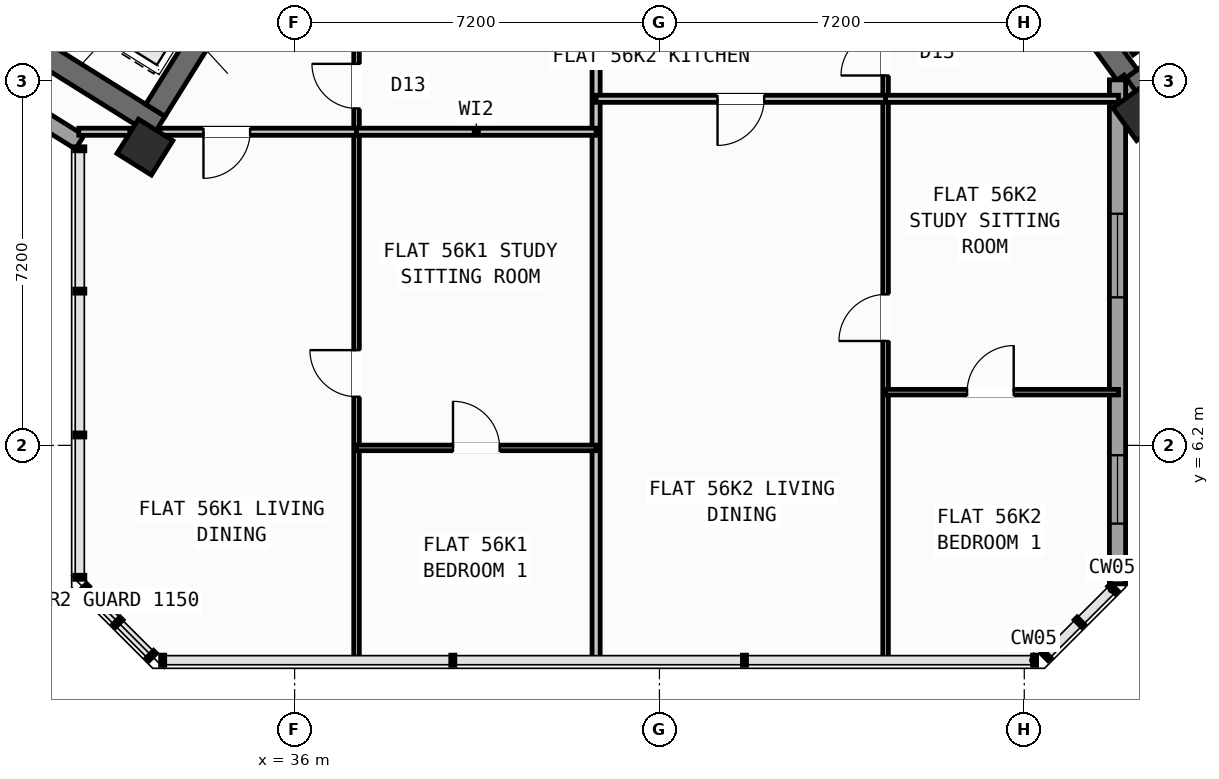
"""IFC4 building model, lengths in metres.
Left out: names, types, materials, properties, quantities, classifications, styles, units other than length and angle.
Written with IfcOpenShell. Run it as: python <this file> out.ifc"""

import sys

from ifc_helpers import new_model, si_unit, direction, frame, frame_2d, origin, origin_2d, place, context, subcontext, project, spatial, rectangle, hollow_rectangle, extrude, source, transform, mapped, element, fill, save


model = new_model("IFC4")
c1 = context("Model", 3, precision=1e-05, world=origin(), true_north=direction((0.0, 1.0)))
c2 = subcontext(c1, "Body", "Model", "MODEL_VIEW")
j1 = project(units=[si_unit("LENGTHUNIT", "METRE"), si_unit("PLANEANGLEUNIT", "RADIAN")], contexts=[c1])
p1 = place(None, origin())
s1 = spatial("IfcSite", under=j1, at=p1, CompositionType="ELEMENT")
p2 = place(p1, origin())
s2 = spatial("IfcBuilding", under=s1, at=p2, CompositionType="ELEMENT")
p3 = place(p2, frame((0.0, 0.0, 222.0)))
s3 = spatial("IfcBuildingStorey", under=s2, at=p3, CompositionType="ELEMENT", Elevation=222.0)
p4 = place(p3, frame((33.324, 12.503, 0.0), z_axis=(0.0, 0.0, 1.0), x_axis=(-0.848043529849, 0.529926571782, 0.0)))
e1 = element("IfcWall", 1, at=p4, inside=s3, PredefinedType="SHEAR", context=c2, shape_type="SweptSolid", body=[
    extrude(rectangle(XDim=13.04, YDim=0.45, at=frame_2d((6.52, 0.0))), origin(), (0.0, 0.0, 1.0), 3.35),
])
p5 = place(p3, frame((36.683, 18.304, 0.0), z_axis=(0.0, 0.0, 1.0), x_axis=(-0.529904039071, -0.848057609704, 0.0)))
e2 = element("IfcWall", 2, at=p5, inside=s3, PredefinedType="SHEAR", context=c2, shape_type="SweptSolid", body=[
    extrude(rectangle(XDim=6.475, YDim=0.45, at=frame_2d((3.238, 0.0))), origin(), (0.0, 0.0, 1.0), 3.35),
])
p6 = place(p3, frame((52.399, 13.169, 0.0), z_axis=(0.0, 0.0, 1.0), x_axis=(0.809022352778, 0.587777877013, 0.0)))
e3 = element("IfcWall", 3, at=p6, inside=s3, PredefinedType="SHEAR", context=c2, shape_type="SweptSolid", body=[
    extrude(rectangle(XDim=12.24, YDim=0.45, at=frame_2d((6.12, 0.0))), origin(), (0.0, 0.0, 1.0), 3.35),
])
p7 = place(p3, frame((52.449, 13.483, 0.0), z_axis=(0.0, 0.0, 1.0), x_axis=(-0.587819244441, 0.808992296542, 0.0)))
e4 = element("IfcWall", 4, at=p7, inside=s3, PredefinedType="SHEAR", context=c2, shape_type="SweptSolid", body=[
    extrude(rectangle(XDim=3.625, YDim=0.45, at=frame_2d((1.812, 0.0))), origin(), (0.0, 0.0, 1.0), 3.35),
])
m1 = source(origin(), c2, "Body", "SweptSolid", [
    extrude(hollow_rectangle(XDim=0.8, YDim=0.8, WallThickness=0.032, at=origin_2d()), origin(), (0.0, 0.0, 1.0), 3.6),
])
for number, where, z_axis, x_axis in (
    (5, (33.046, 12.087, 0.0), (0.0, 0.0, 1.0), (-0.848, 0.53, 0.0)),
    (6, (52.705, 12.773, 0.0), (0.0, 0.0, 1.0), (0.809, 0.588, 0.0)),
):
    element("IfcColumn", number, at=place(p3, frame(where, z_axis=z_axis, x_axis=x_axis)), inside=s3, PredefinedType="COLUMN", context=c2, shape_type="MappedRepresentation", body=[
        mapped(m1, transform((0.0, 0.0, 0.0), scale=1.0)),
    ])
p8 = place(p3, frame((31.76, 12.183, 0.0), z_axis=(0.0, 0.0, 1.0), x_axis=(-0.848047074256, 0.529920899612, 0.0)))
e7 = element("IfcWall", 7, at=p8, inside=s3, PredefinedType="STANDARD", context=c2, shape_type="SweptSolid", body=[
    extrude(rectangle(XDim=30.652, YDim=0.32, at=frame_2d((15.326, 0.0))), origin(), (0.0, 0.0, 1.0), 3.35),
])
p9 = place(p8, frame((15.166, 0.0, 0.0)))
e8 = element("IfcOpeningElement", 8, at=p9, cuts=e7, PredefinedType="OPENING", context=c2, shape_type="SweptSolid", body=[
    extrude(rectangle(XDim=1.2, YDim=2.15, at=frame_2d((0.6, 1.075))), frame((0.0, 0.17, 0.0), z_axis=(0.0, -1.0, 0.0), x_axis=(1.0, 0.0, 0.0)), (0.0, 0.0, 1.0), 0.34),
])
p10 = place(p8, frame((2.24, 0.0, 0.9)))
e9 = element("IfcOpeningElement", 9, at=p10, cuts=e7, PredefinedType="OPENING", context=c2, shape_type="SweptSolid", body=[
    extrude(rectangle(XDim=1.65, YDim=1.45, at=frame_2d((0.825, 0.725))), frame((0.0, 0.17, 0.0), z_axis=(0.0, -1.0, 0.0), x_axis=(1.0, 0.0, 0.0)), (0.0, 0.0, 1.0), 0.34),
])
p11 = place(p8, frame((7.469, 0.0, 0.9)))
e10 = element("IfcOpeningElement", 10, at=p11, cuts=e7, PredefinedType="OPENING", context=c2, shape_type="SweptSolid", body=[
    extrude(rectangle(XDim=1.65, YDim=1.45, at=frame_2d((0.825, 0.725))), frame((0.0, 0.17, 0.0), z_axis=(0.0, -1.0, 0.0), x_axis=(1.0, 0.0, 0.0)), (0.0, 0.0, 1.0), 0.34),
])
p12 = place(p8, frame((12.623, 0.0, 1.0)))
e11 = element("IfcOpeningElement", 11, at=p12, cuts=e7, PredefinedType="OPENING", context=c2, shape_type="SweptSolid", body=[
    extrude(rectangle(XDim=0.9, YDim=1.25, at=frame_2d((0.45, 0.625))), frame((0.0, 0.17, 0.0), z_axis=(0.0, -1.0, 0.0), x_axis=(1.0, 0.0, 0.0)), (0.0, 0.0, 1.0), 0.34),
])
p13 = place(p8, frame((19.583, 0.0, 1.0)))
e12 = element("IfcOpeningElement", 12, at=p13, cuts=e7, PredefinedType="OPENING", context=c2, shape_type="SweptSolid", body=[
    extrude(rectangle(XDim=0.9, YDim=1.25, at=frame_2d((0.45, 0.625))), frame((0.0, 0.17, 0.0), z_axis=(0.0, -1.0, 0.0), x_axis=(1.0, 0.0, 0.0)), (0.0, 0.0, 1.0), 0.34),
])
p14 = place(p8, frame((22.033, 0.0, 1.0)))
e13 = element("IfcOpeningElement", 13, at=p14, cuts=e7, PredefinedType="OPENING", context=c2, shape_type="SweptSolid", body=[
    extrude(rectangle(XDim=0.9, YDim=1.25, at=frame_2d((0.45, 0.625))), frame((0.0, 0.17, 0.0), z_axis=(0.0, -1.0, 0.0), x_axis=(1.0, 0.0, 0.0)), (0.0, 0.0, 1.0), 0.34),
])
p15 = place(p8, frame((27.666, 0.0, 0.9)))
e14 = element("IfcOpeningElement", 14, at=p15, cuts=e7, PredefinedType="OPENING", context=c2, shape_type="SweptSolid", body=[
    extrude(rectangle(XDim=1.35, YDim=1.45, at=frame_2d((0.675, 0.725))), frame((0.0, 0.17, 0.0), z_axis=(0.0, -1.0, 0.0), x_axis=(1.0, 0.0, 0.0)), (0.0, 0.0, 1.0), 0.34),
])
p16 = place(p3, frame((52.937, 12.455, 0.0), z_axis=(0.0, 0.0, 1.0), x_axis=(-0.587706324018, 0.809074333241, 0.0)))
e15 = element("IfcWall", 15, at=p16, inside=s3, PredefinedType="STANDARD", context=c2, shape_type="SweptSolid", body=[
    extrude(rectangle(XDim=1.186, YDim=0.32, at=frame_2d((0.593, 0.0))), origin(), (0.0, 0.0, 1.0), 3.35),
])
p17 = place(p3, frame((52.24, 13.414, 0.0), z_axis=(0.0, 0.0, 1.0), x_axis=(0.0, -1.0, 0.0)))
e16 = element("IfcWall", 16, at=p17, inside=s3, PredefinedType="STANDARD", context=c2, shape_type="SweptSolid", body=[
    extrude(rectangle(XDim=9.948, YDim=0.32, at=frame_2d((4.974, 0.0))), origin(), (0.0, 0.0, 1.0), 3.35),
])
p18 = place(p17, frame((2.643, 0.0, 0.9)))
e17 = element("IfcOpeningElement", 17, at=p18, cuts=e16, PredefinedType="OPENING", context=c2, shape_type="SweptSolid", body=[
    extrude(rectangle(XDim=1.65, YDim=1.45, at=frame_2d((0.825, 0.725))), frame((0.0, 0.17, 0.0), z_axis=(0.0, -1.0, 0.0), x_axis=(1.0, 0.0, 0.0)), (0.0, 0.0, 1.0), 0.34),
])
p19 = place(p17, frame((7.408, 0.0, 0.9)))
e18 = element("IfcOpeningElement", 18, at=p19, cuts=e16, PredefinedType="OPENING", context=c2, shape_type="SweptSolid", body=[
    extrude(rectangle(XDim=1.35, YDim=1.45, at=frame_2d((0.675, 0.725))), frame((0.0, 0.17, 0.0), z_axis=(0.0, -1.0, 0.0), x_axis=(1.0, 0.0, 0.0)), (0.0, 0.0, 1.0), 0.34),
])
p20 = place(p3, frame((52.472, 14.013, 0.0), z_axis=(0.0, 0.0, 1.0), x_axis=(0.809028366311, 0.587769599847, 0.0)))
e19 = element("IfcWall", 19, at=p20, inside=s3, PredefinedType="SHEAR", context=c2, shape_type="SweptSolid", body=[
    extrude(rectangle(XDim=7.33, YDim=0.26, at=frame_2d((3.665, 0.0))), origin(), (0.0, 0.0, 1.0), 3.35),
])
p21 = place(p3, frame((41.95, 1.96, 0.0), z_axis=(0.0, 0.0, 1.0), x_axis=(0.0, 1.0, 0.0)))
e20 = element("IfcWall", 20, at=p21, inside=s3, PredefinedType="PARTITIONING", context=c2, shape_type="SweptSolid", body=[
    extrude(rectangle(XDim=13.46, YDim=0.16, at=frame_2d((6.73, 0.0))), origin(), (0.0, 0.0, 1.0), 3.34),
])
p22 = place(p3, frame((37.222, 1.96, 0.0), z_axis=(0.0, 0.0, 1.0), x_axis=(0.0, 1.0, 0.0)))
e21 = element("IfcWall", 21, at=p22, inside=s3, PredefinedType="PARTITIONING", context=c2, shape_type="SweptSolid", body=[
    extrude(rectangle(XDim=13.46, YDim=0.11, at=frame_2d((6.73, 0.0))), origin(), (0.0, 0.0, 1.0), 3.34),
])
p23 = place(p22, frame((5.2, 0.0, 0.0)))
e22 = element("IfcOpeningElement", 22, at=p23, cuts=e21, PredefinedType="OPENING", context=c2, shape_type="SweptSolid", body=[
    extrude(rectangle(XDim=0.92, YDim=2.08, at=frame_2d((0.46, 1.04))), frame((0.0, 0.065, 0.0), z_axis=(0.0, -1.0, 0.0), x_axis=(1.0, 0.0, 0.0)), (0.0, 0.0, 1.0), 0.13),
])
p24 = place(p22, frame((10.89, 0.0, 0.0)))
e23 = element("IfcOpeningElement", 23, at=p24, cuts=e21, PredefinedType="OPENING", context=c2, shape_type="SweptSolid", body=[
    extrude(rectangle(XDim=0.88, YDim=2.08, at=frame_2d((0.44, 1.04))), frame((0.0, 0.065, 0.0), z_axis=(0.0, -1.0, 0.0), x_axis=(1.0, 0.0, 0.0)), (0.0, 0.0, 1.0), 0.13),
])
p25 = place(p3, frame((31.74, 12.39, 0.0), z_axis=(0.0, 0.0, 1.0), x_axis=(1.0, 0.0, 0.0)))
e24 = element("IfcWall", 24, at=p25, inside=s3, PredefinedType="PLUMBINGWALL", context=c2, shape_type="SweptSolid", body=[
    extrude(rectangle(XDim=1.01, YDim=0.14, at=frame_2d((0.505, 0.0))), origin(), (0.0, 0.0, 1.0), 3.34),
])
p26 = place(p3, frame((33.339, 12.39, 0.0), z_axis=(0.0, 0.0, 1.0), x_axis=(1.0, 0.0, 0.0)))
e25 = element("IfcWall", 25, at=p26, inside=s3, PredefinedType="PLUMBINGWALL", context=c2, shape_type="SweptSolid", body=[
    extrude(rectangle(XDim=3.883, YDim=0.14, at=frame_2d((1.942, 0.0))), origin(), (0.0, 0.0, 1.0), 2.525),
])
p27 = place(p26, frame((0.863, 0.0, 0.0)))
e26 = element("IfcOpeningElement", 26, at=p27, cuts=e25, PredefinedType="OPENING", context=c2, shape_type="SweptSolid", body=[
    extrude(rectangle(XDim=0.92, YDim=2.08, at=frame_2d((0.46, 1.04))), frame((0.0, 0.08, 0.0), z_axis=(0.0, -1.0, 0.0), x_axis=(1.0, 0.0, 0.0)), (0.0, 0.0, 1.0), 0.16),
])
p28 = place(p3, frame((37.222, 12.39, 0.0), z_axis=(0.0, 0.0, 1.0), x_axis=(1.0, 0.0, 0.0)))
e27 = element("IfcWall", 27, at=p28, inside=s3, PredefinedType="PLUMBINGWALL", context=c2, shape_type="SweptSolid", body=[
    extrude(rectangle(XDim=4.728, YDim=0.14, at=frame_2d((2.364, 0.0))), origin(), (0.0, 0.0, 1.0), 2.525),
])
p29 = place(p3, frame((37.222, 6.15, 0.0), z_axis=(0.0, 0.0, 1.0), x_axis=(1.0, 0.0, 0.0)))
e28 = element("IfcWall", 28, at=p29, inside=s3, PredefinedType="PARTITIONING", context=c2, shape_type="SweptSolid", body=[
    extrude(rectangle(XDim=4.728, YDim=0.11, at=frame_2d((2.364, 0.0))), origin(), (0.0, 0.0, 1.0), 3.34),
])
p30 = place(p29, frame((1.904, 0.0, 0.0)))
e29 = element("IfcOpeningElement", 29, at=p30, cuts=e28, PredefinedType="OPENING", context=c2, shape_type="SweptSolid", body=[
    extrude(rectangle(XDim=0.92, YDim=2.08, at=frame_2d((0.46, 1.04))), frame((0.0, 0.065, 0.0), z_axis=(0.0, -1.0, 0.0), x_axis=(1.0, 0.0, 0.0)), (0.0, 0.0, 1.0), 0.13),
])
p31 = place(p3, frame((47.663, 1.96, 0.0), z_axis=(0.0, 0.0, 1.0), x_axis=(0.0, 1.0, 0.0)))
e30 = element("IfcWall", 30, at=p31, inside=s3, PredefinedType="PARTITIONING", context=c2, shape_type="SweptSolid", body=[
    extrude(rectangle(XDim=13.46, YDim=0.11, at=frame_2d((6.73, 0.0))), origin(), (0.0, 0.0, 1.0), 3.34),
])
p32 = place(p31, frame((6.3, 0.0, 0.0)))
e31 = element("IfcOpeningElement", 31, at=p32, cuts=e30, PredefinedType="OPENING", context=c2, shape_type="SweptSolid", body=[
    extrude(rectangle(XDim=0.92, YDim=2.08, at=frame_2d((0.46, 1.04))), frame((0.0, 0.065, 0.0), z_axis=(0.0, -1.0, 0.0), x_axis=(1.0, 0.0, 0.0)), (0.0, 0.0, 1.0), 0.13),
])
p33 = place(p31, frame((11.54, 0.0, 0.0)))
e32 = element("IfcOpeningElement", 32, at=p33, cuts=e30, PredefinedType="OPENING", context=c2, shape_type="SweptSolid", body=[
    extrude(rectangle(XDim=0.88, YDim=2.08, at=frame_2d((0.44, 1.04))), frame((0.0, 0.065, 0.0), z_axis=(0.0, -1.0, 0.0), x_axis=(1.0, 0.0, 0.0)), (0.0, 0.0, 1.0), 0.13),
])
p34 = place(p3, frame((41.95, 13.04, 0.0), z_axis=(0.0, 0.0, 1.0), x_axis=(1.0, 0.0, 0.0)))
e33 = element("IfcWall", 33, at=p34, inside=s3, PredefinedType="PLUMBINGWALL", context=c2, shape_type="SweptSolid", body=[
    extrude(rectangle(XDim=5.713, YDim=0.14, at=frame_2d((2.856, 0.0))), origin(), (0.0, 0.0, 1.0), 3.34),
])
p35 = place(p34, frame((2.396, 0.0, 0.0)))
e34 = element("IfcOpeningElement", 34, at=p35, cuts=e33, PredefinedType="OPENING", context=c2, shape_type="SweptSolid", body=[
    extrude(rectangle(XDim=0.92, YDim=2.08, at=frame_2d((0.46, 1.04))), frame((0.0, 0.08, 0.0), z_axis=(0.0, -1.0, 0.0), x_axis=(1.0, 0.0, 0.0)), (0.0, 0.0, 1.0), 0.16),
])
p36 = place(p3, frame((47.663, 13.04, 0.0), z_axis=(0.0, 0.0, 1.0), x_axis=(1.0, 0.0, 0.0)))
e35 = element("IfcWall", 35, at=p36, inside=s3, PredefinedType="PLUMBINGWALL", context=c2, shape_type="SweptSolid", body=[
    extrude(rectangle(XDim=4.597, YDim=0.14, at=frame_2d((2.298, 0.0))), origin(), (0.0, 0.0, 1.0), 2.525),
])
p37 = place(p3, frame((47.663, 7.25, 0.0), z_axis=(0.0, 0.0, 1.0), x_axis=(1.0, 0.0, 0.0)))
e36 = element("IfcWall", 36, at=p37, inside=s3, PredefinedType="PARTITIONING", context=c2, shape_type="SweptSolid", body=[
    extrude(rectangle(XDim=4.597, YDim=0.11, at=frame_2d((2.298, 0.0))), origin(), (0.0, 0.0, 1.0), 3.34),
])
p38 = place(p37, frame((1.608, 0.0, 0.0)))
e37 = element("IfcOpeningElement", 37, at=p38, cuts=e36, PredefinedType="OPENING", context=c2, shape_type="SweptSolid", body=[
    extrude(rectangle(XDim=0.92, YDim=2.08, at=frame_2d((0.46, 1.04))), frame((0.0, 0.065, 0.0), z_axis=(0.0, -1.0, 0.0), x_axis=(1.0, 0.0, 0.0)), (0.0, 0.0, 1.0), 0.13),
])
m2 = source(origin(), c2, "Body", "SweptSolid", [
    extrude(rectangle(XDim=1.65, YDim=1.45, at=frame_2d((0.825, 0.725))), frame((0.0, 0.03, 0.0), z_axis=(0.0, -1.0, 0.0), x_axis=(1.0, 0.0, 0.0)), (0.0, 0.0, 1.0), 0.06),
])
p39 = place(p18, origin())
e38 = element("IfcWindow", 38, at=p39, inside=s3, PartitioningType="SINGLE_PANEL", PredefinedType="WINDOW", context=c2, shape_type="MappedRepresentation", body=[
    mapped(m2, transform((0.0, 0.0, 0.0), scale=1.0)),
])
fill(e17, e38)
m3 = source(origin(), c2, "Body", "SweptSolid", [
    extrude(rectangle(XDim=1.35, YDim=1.45, at=frame_2d((0.675, 0.725))), frame((0.0, 0.03, 0.0), z_axis=(0.0, -1.0, 0.0), x_axis=(1.0, 0.0, 0.0)), (0.0, 0.0, 1.0), 0.06),
])
p40 = place(p19, origin())
e39 = element("IfcWindow", 39, at=p40, inside=s3, PartitioningType="SINGLE_PANEL", PredefinedType="WINDOW", context=c2, shape_type="MappedRepresentation", body=[
    mapped(m3, transform((0.0, 0.0, 0.0), scale=1.0)),
])
fill(e18, e39)
m4 = source(origin(), c2, "Body", "SweptSolid", [
    extrude(rectangle(XDim=0.92, YDim=2.08, at=frame_2d((0.46, 1.04))), frame((0.0, 0.025, 0.0), z_axis=(0.0, -1.0, 0.0), x_axis=(1.0, 0.0, 0.0)), (0.0, 0.0, 1.0), 0.05),
])
p41 = place(p23, origin())
e40 = element("IfcDoor", 40, at=p41, inside=s3, OperationType="SINGLE_SWING_RIGHT", PredefinedType="DOOR", context=c2, shape_type="MappedRepresentation", body=[
    mapped(m4, transform((0.0, 0.0, 0.0), scale=1.0)),
])
fill(e22, e40)
p42 = place(p30, origin())
e41 = element("IfcDoor", 41, at=p42, inside=s3, OperationType="SINGLE_SWING_LEFT", PredefinedType="DOOR", context=c2, shape_type="MappedRepresentation", body=[
    mapped(m4, transform((0.0, 0.0, 0.0), scale=1.0)),
])
fill(e29, e41)
p43 = place(p27, frame((0.92, 0.0, 0.0), z_axis=(0.0, 0.0, 1.0), x_axis=(-1.0, 0.0, 0.0)))
e42 = element("IfcDoor", 42, at=p43, inside=s3, OperationType="SINGLE_SWING_RIGHT", PredefinedType="DOOR", context=c2, shape_type="MappedRepresentation", body=[
    mapped(m4, transform((0.0, 0.0, 0.0), scale=1.0)),
])
fill(e26, e42)
m5 = source(origin(), c2, "Body", "SweptSolid", [
    extrude(rectangle(XDim=0.88, YDim=2.08, at=frame_2d((0.44, 1.04))), frame((0.0, 0.025, 0.0), z_axis=(0.0, -1.0, 0.0), x_axis=(1.0, 0.0, 0.0)), (0.0, 0.0, 1.0), 0.05),
])
p44 = place(p24, origin())
e43 = element("IfcDoor", 43, at=p44, inside=s3, OperationType="SINGLE_SWING_RIGHT", PredefinedType="DOOR", context=c2, shape_type="MappedRepresentation", body=[
    mapped(m5, transform((0.0, 0.0, 0.0), scale=1.0)),
])
fill(e23, e43)
p45 = place(p32, origin())
e44 = element("IfcDoor", 44, at=p45, inside=s3, OperationType="SINGLE_SWING_LEFT", PredefinedType="DOOR", context=c2, shape_type="MappedRepresentation", body=[
    mapped(m4, transform((0.0, 0.0, 0.0), scale=1.0)),
])
fill(e31, e44)
p46 = place(p38, origin())
e45 = element("IfcDoor", 45, at=p46, inside=s3, OperationType="SINGLE_SWING_RIGHT", PredefinedType="DOOR", context=c2, shape_type="MappedRepresentation", body=[
    mapped(m4, transform((0.0, 0.0, 0.0), scale=1.0)),
])
fill(e37, e45)
p47 = place(p35, frame((0.92, 0.0, 0.0), z_axis=(0.0, 0.0, 1.0), x_axis=(-1.0, 0.0, 0.0)))
e46 = element("IfcDoor", 46, at=p47, inside=s3, OperationType="SINGLE_SWING_RIGHT", PredefinedType="DOOR", context=c2, shape_type="MappedRepresentation", body=[
    mapped(m4, transform((0.0, 0.0, 0.0), scale=1.0)),
])
fill(e34, e46)
p48 = place(p33, origin())
e47 = element("IfcDoor", 47, at=p48, inside=s3, OperationType="SINGLE_SWING_LEFT", PredefinedType="DOOR", context=c2, shape_type="MappedRepresentation", body=[
    mapped(m5, transform((0.0, 0.0, 0.0), scale=1.0)),
])
fill(e32, e47)
save(model, sys.argv[1])
